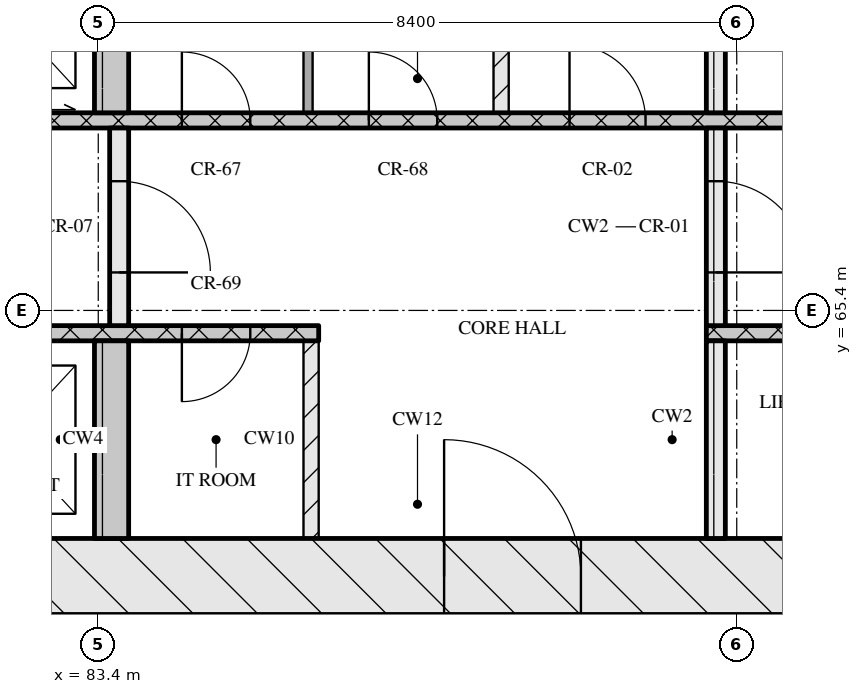
"""IFC4 building model, lengths in metres.
Left out: names, types, materials, properties, quantities, classifications, styles, units other than length and angle.
Written with IfcOpenShell. Run it as: python <this file> out.ifc"""

import sys

from ifc_helpers import new_model, si_unit, direction, frame, frame_2d, origin, place, context, subcontext, project, spatial, rectangle, extrude, element, fill, save


model = new_model("IFC4")
c1 = context("Model", 3, precision=1e-05, world=origin(), true_north=direction((0.0, 1.0)))
c2 = subcontext(c1, "Body", "Model", "MODEL_VIEW")
j1 = project(units=[si_unit("LENGTHUNIT", "METRE"), si_unit("PLANEANGLEUNIT", "RADIAN")], contexts=[c1])
p1 = place(None, origin())
s1 = spatial("IfcSite", under=j1, at=p1, CompositionType="ELEMENT")
p2 = place(p1, origin())
s2 = spatial("IfcBuilding", under=s1, at=p2, CompositionType="ELEMENT")
p3 = place(p2, frame((0.0, 0.0, 102.45)))
s3 = spatial("IfcBuildingStorey", under=s2, at=p3, CompositionType="ELEMENT", Elevation=102.45)
p4 = place(p3, frame((66.8, 61.9, 0.0), z_axis=(0.0, 0.0, 1.0), x_axis=(1.0, 0.0, 0.0)))
e1 = element("IfcWall", 1, at=p4, inside=s3, PredefinedType="SOLIDWALL", context=c2, shape_type="SweptSolid", body=[
    extrude(rectangle(XDim=41.6, YDim=1.0, at=frame_2d((20.8, 0.0))), origin(), (0.0, 0.0, 1.0), 3.32),
])
p5 = place(p4, frame((21.15, 0.0, 0.0)))
e2 = element("IfcOpeningElement", 2, at=p5, cuts=e1, PredefinedType="OPENING", context=c2, shape_type="SweptSolid", body=[
    extrude(rectangle(XDim=1.8, YDim=2.1, at=frame_2d((0.9, 1.05))), frame((0.0, 0.51, 0.0), z_axis=(0.0, -1.0, 0.0), x_axis=(1.0, 0.0, 0.0)), (0.0, 0.0, 1.0), 1.02),
])
p6 = place(p3, frame((83.575, 62.4, 0.0), z_axis=(0.0, 0.0, 1.0), x_axis=(0.0, 1.0, 0.0)))
e3 = element("IfcWall", 3, at=p6, inside=s3, PredefinedType="SOLIDWALL", context=c2, shape_type="SweptSolid", body=[
    extrude(rectangle(XDim=2.6, YDim=0.45, at=frame_2d((1.3, 0.0))), origin(), (0.0, 0.0, 1.0), 3.32),
])
p7 = place(p3, frame((86.2, 62.4, 0.0), z_axis=(0.0, 0.0, 1.0), x_axis=(0.0, 1.0, 0.0)))
e4 = element("IfcWall", 4, at=p7, inside=s3, PredefinedType="PARTITIONING", context=c2, shape_type="SweptSolid", body=[
    extrude(rectangle(XDim=2.6, YDim=0.2, at=frame_2d((1.3, 0.0))), origin(), (0.0, 0.0, 1.0), 3.32),
])
p8 = place(p3, frame((91.525, 62.4, 0.0), z_axis=(0.0, 0.0, 1.0), x_axis=(0.0, 1.0, 0.0)))
e5 = element("IfcWall", 5, at=p8, inside=s3, PredefinedType="SOLIDWALL", context=c2, shape_type="SweptSolid", body=[
    extrude(rectangle(XDim=2.6, YDim=0.25, at=frame_2d((1.3, 0.0))), origin(), (0.0, 0.0, 1.0), 3.32),
])
p9 = place(p3, frame((67.8, 65.1, 0.0), z_axis=(0.0, 0.0, 1.0), x_axis=(1.0, 0.0, 0.0)))
e6 = element("IfcWall", 6, at=p9, inside=s3, PredefinedType="SOLIDWALL", context=c2, shape_type="SweptSolid", body=[
    extrude(rectangle(XDim=18.5, YDim=0.2, at=frame_2d((9.25, 0.0))), origin(), (0.0, 0.0, 1.0), 3.32),
])
p10 = place(p9, frame((7.27, 0.0, 0.0)))
e7 = element("IfcOpeningElement", 7, at=p10, cuts=e6, PredefinedType="OPENING", context=c2, shape_type="SweptSolid", body=[
    extrude(rectangle(XDim=0.9, YDim=2.1, at=frame_2d((0.45, 1.05))), frame((0.0, 0.11, 0.0), z_axis=(0.0, -1.0, 0.0), x_axis=(1.0, 0.0, 0.0)), (0.0, 0.0, 1.0), 0.22),
])
p11 = place(p9, frame((8.85, 0.0, 0.0)))
e8 = element("IfcOpeningElement", 8, at=p11, cuts=e6, PredefinedType="OPENING", context=c2, shape_type="SweptSolid", body=[
    extrude(rectangle(XDim=1.1, YDim=2.1, at=frame_2d((0.55, 1.05))), frame((0.0, 0.11, 0.0), z_axis=(0.0, -1.0, 0.0), x_axis=(1.0, 0.0, 0.0)), (0.0, 0.0, 1.0), 0.22),
])
p12 = place(p9, frame((11.35, 0.0, 0.0)))
e9 = element("IfcOpeningElement", 9, at=p12, cuts=e6, PredefinedType="OPENING", context=c2, shape_type="SweptSolid", body=[
    extrude(rectangle(XDim=1.1, YDim=2.1, at=frame_2d((0.55, 1.05))), frame((0.0, 0.11, 0.0), z_axis=(0.0, -1.0, 0.0), x_axis=(1.0, 0.0, 0.0)), (0.0, 0.0, 1.0), 0.22),
])
p13 = place(p9, frame((13.85, 0.0, 0.0)))
e10 = element("IfcOpeningElement", 10, at=p13, cuts=e6, PredefinedType="OPENING", context=c2, shape_type="SweptSolid", body=[
    extrude(rectangle(XDim=1.1, YDim=2.1, at=frame_2d((0.55, 1.05))), frame((0.0, 0.11, 0.0), z_axis=(0.0, -1.0, 0.0), x_axis=(1.0, 0.0, 0.0)), (0.0, 0.0, 1.0), 0.22),
])
p14 = place(p9, frame((16.7, 0.0, 0.0)))
e11 = element("IfcOpeningElement", 11, at=p14, cuts=e6, PredefinedType="OPENING", context=c2, shape_type="SweptSolid", body=[
    extrude(rectangle(XDim=0.9, YDim=2.1, at=frame_2d((0.45, 1.05))), frame((0.0, 0.11, 0.0), z_axis=(0.0, -1.0, 0.0), x_axis=(1.0, 0.0, 0.0)), (0.0, 0.0, 1.0), 0.22),
])
p15 = place(p3, frame((91.4, 65.1, 0.0), z_axis=(0.0, 0.0, 1.0), x_axis=(1.0, 0.0, 0.0)))
e12 = element("IfcWall", 12, at=p15, inside=s3, PredefinedType="SOLIDWALL", context=c2, shape_type="SweptSolid", body=[
    extrude(rectangle(XDim=16.0, YDim=0.2, at=frame_2d((8.0, 0.0))), origin(), (0.0, 0.0, 1.0), 3.32),
])
p16 = place(p15, frame((7.83, 0.0, 0.0)))
e13 = element("IfcOpeningElement", 13, at=p16, cuts=e12, PredefinedType="OPENING", context=c2, shape_type="SweptSolid", body=[
    extrude(rectangle(XDim=0.9, YDim=2.1, at=frame_2d((0.45, 1.05))), frame((0.0, 0.11, 0.0), z_axis=(0.0, -1.0, 0.0), x_axis=(1.0, 0.0, 0.0)), (0.0, 0.0, 1.0), 0.22),
])
p17 = place(p3, frame((83.675, 65.2, 0.0), z_axis=(0.0, 0.0, 1.0), x_axis=(0.0, 1.0, 0.0)))
e14 = element("IfcWall", 14, at=p17, inside=s3, PredefinedType="SOLIDWALL", context=c2, shape_type="SweptSolid", body=[
    extrude(rectangle(XDim=2.6, YDim=0.25, at=frame_2d((1.3, 0.0))), origin(), (0.0, 0.0, 1.0), 3.32),
])
p18 = place(p17, frame((0.7, 0.0, 0.0)))
e15 = element("IfcOpeningElement", 15, at=p18, cuts=e14, PredefinedType="OPENING", context=c2, shape_type="SweptSolid", body=[
    extrude(rectangle(XDim=1.2, YDim=2.1, at=frame_2d((0.6, 1.05))), frame((0.0, 0.135, 0.0), z_axis=(0.0, -1.0, 0.0), x_axis=(1.0, 0.0, 0.0)), (0.0, 0.0, 1.0), 0.27),
])
p19 = place(p3, frame((91.525, 65.2, 0.0), z_axis=(0.0, 0.0, 1.0), x_axis=(0.0, 1.0, 0.0)))
e16 = element("IfcWall", 16, at=p19, inside=s3, PredefinedType="SOLIDWALL", context=c2, shape_type="SweptSolid", body=[
    extrude(rectangle(XDim=2.6, YDim=0.25, at=frame_2d((1.3, 0.0))), origin(), (0.0, 0.0, 1.0), 3.32),
])
p20 = place(p19, frame((0.7, 0.0, 0.0)))
e17 = element("IfcOpeningElement", 17, at=p20, cuts=e16, PredefinedType="OPENING", context=c2, shape_type="SweptSolid", body=[
    extrude(rectangle(XDim=1.2, YDim=2.1, at=frame_2d((0.6, 1.05))), frame((0.0, 0.135, 0.0), z_axis=(0.0, -1.0, 0.0), x_axis=(1.0, 0.0, 0.0)), (0.0, 0.0, 1.0), 0.27),
])
p21 = place(p3, frame((76.05, 67.9, 0.0), z_axis=(0.0, 0.0, 1.0), x_axis=(1.0, 0.0, 0.0)))
e18 = element("IfcWall", 18, at=p21, inside=s3, PredefinedType="SOLIDWALL", context=c2, shape_type="SweptSolid", body=[
    extrude(rectangle(XDim=23.1, YDim=0.2, at=frame_2d((11.55, 0.0))), origin(), (0.0, 0.0, 1.0), 3.32),
])
p22 = place(p21, frame((0.6, 0.0, 0.0)))
e19 = element("IfcOpeningElement", 19, at=p22, cuts=e18, PredefinedType="OPENING", context=c2, shape_type="SweptSolid", body=[
    extrude(rectangle(XDim=1.1, YDim=2.1, at=frame_2d((0.55, 1.05))), frame((0.0, 0.11, 0.0), z_axis=(0.0, -1.0, 0.0), x_axis=(1.0, 0.0, 0.0)), (0.0, 0.0, 1.0), 0.22),
])
p23 = place(p21, frame((3.1, 0.0, 0.0)))
e20 = element("IfcOpeningElement", 20, at=p23, cuts=e18, PredefinedType="OPENING", context=c2, shape_type="SweptSolid", body=[
    extrude(rectangle(XDim=1.1, YDim=2.1, at=frame_2d((0.55, 1.05))), frame((0.0, 0.11, 0.0), z_axis=(0.0, -1.0, 0.0), x_axis=(1.0, 0.0, 0.0)), (0.0, 0.0, 1.0), 0.22),
])
p24 = place(p21, frame((5.6, 0.0, 0.0)))
e21 = element("IfcOpeningElement", 21, at=p24, cuts=e18, PredefinedType="OPENING", context=c2, shape_type="SweptSolid", body=[
    extrude(rectangle(XDim=1.1, YDim=2.1, at=frame_2d((0.55, 1.05))), frame((0.0, 0.11, 0.0), z_axis=(0.0, -1.0, 0.0), x_axis=(1.0, 0.0, 0.0)), (0.0, 0.0, 1.0), 0.22),
])
p25 = place(p21, frame((8.45, 0.0, 0.0)))
e22 = element("IfcOpeningElement", 22, at=p25, cuts=e18, PredefinedType="OPENING", context=c2, shape_type="SweptSolid", body=[
    extrude(rectangle(XDim=0.9, YDim=2.1, at=frame_2d((0.45, 1.05))), frame((0.0, 0.11, 0.0), z_axis=(0.0, -1.0, 0.0), x_axis=(1.0, 0.0, 0.0)), (0.0, 0.0, 1.0), 0.22),
])
p26 = place(p21, frame((10.91, 0.0, 0.0)))
e23 = element("IfcOpeningElement", 23, at=p26, cuts=e18, PredefinedType="OPENING", context=c2, shape_type="SweptSolid", body=[
    extrude(rectangle(XDim=0.9, YDim=2.1, at=frame_2d((0.45, 1.05))), frame((0.0, 0.11, 0.0), z_axis=(0.0, -1.0, 0.0), x_axis=(1.0, 0.0, 0.0)), (0.0, 0.0, 1.0), 0.22),
])
p27 = place(p21, frame((13.55, 0.0, 0.0)))
e24 = element("IfcOpeningElement", 24, at=p27, cuts=e18, PredefinedType="OPENING", context=c2, shape_type="SweptSolid", body=[
    extrude(rectangle(XDim=1.0, YDim=2.1, at=frame_2d((0.5, 1.05))), frame((0.0, 0.11, 0.0), z_axis=(0.0, -1.0, 0.0), x_axis=(1.0, 0.0, 0.0)), (0.0, 0.0, 1.0), 0.22),
])
p28 = place(p3, frame((83.575, 68.0, 0.0), z_axis=(0.0, 0.0, 1.0), x_axis=(0.0, 1.0, 0.0)))
e25 = element("IfcWall", 25, at=p28, inside=s3, PredefinedType="SOLIDWALL", context=c2, shape_type="SweptSolid", body=[
    extrude(rectangle(XDim=2.6, YDim=0.45, at=frame_2d((1.3, 0.0))), origin(), (0.0, 0.0, 1.0), 3.32),
])
p29 = place(p3, frame((86.16, 68.0, 0.0), z_axis=(0.0, 0.0, 1.0), x_axis=(0.0, 1.0, 0.0)))
e26 = element("IfcWall", 26, at=p29, inside=s3, PredefinedType="PARTITIONING", context=c2, shape_type="SweptSolid", body=[
    extrude(rectangle(XDim=2.6, YDim=0.12, at=frame_2d((1.3, 0.0))), origin(), (0.0, 0.0, 1.0), 3.32),
])
p30 = place(p3, frame((88.7, 68.0, 0.0), z_axis=(0.0, 0.0, 1.0), x_axis=(0.0, 1.0, 0.0)))
e27 = element("IfcWall", 27, at=p30, inside=s3, PredefinedType="PARTITIONING", context=c2, shape_type="SweptSolid", body=[
    extrude(rectangle(XDim=2.6, YDim=0.2, at=frame_2d((1.3, 0.0))), origin(), (0.0, 0.0, 1.0), 3.32),
])
p31 = place(p3, frame((91.525, 68.0, 0.0), z_axis=(0.0, 0.0, 1.0), x_axis=(0.0, 1.0, 0.0)))
e28 = element("IfcWall", 28, at=p31, inside=s3, PredefinedType="SOLIDWALL", context=c2, shape_type="SweptSolid", body=[
    extrude(rectangle(XDim=2.6, YDim=0.25, at=frame_2d((1.3, 0.0))), origin(), (0.0, 0.0, 1.0), 3.32),
])
p32 = place(p5, origin())
e29 = element("IfcDoor", 29, at=p32, inside=s3, OperationType="DOUBLE_DOOR_SINGLE_SWING", PredefinedType="DOOR", context=c2, shape_type="SweptSolid", body=[
    extrude(rectangle(XDim=1.8, YDim=2.1, at=frame_2d((0.9, 1.05))), frame((0.0, 0.025, 0.0), z_axis=(0.0, -1.0, 0.0), x_axis=(1.0, 0.0, 0.0)), (0.0, 0.0, 1.0), 0.05),
])
fill(e2, e29)
p33 = place(p14, origin())
e30 = element("IfcDoor", 30, at=p33, inside=s3, OperationType="SINGLE_SWING_RIGHT", PredefinedType="DOOR", context=c2, shape_type="SweptSolid", body=[
    extrude(rectangle(XDim=0.9, YDim=2.1, at=frame_2d((0.45, 1.05))), frame((0.0, 0.025, 0.0), z_axis=(0.0, -1.0, 0.0), x_axis=(1.0, 0.0, 0.0)), (0.0, 0.0, 1.0), 0.05),
])
fill(e11, e30)
p34 = place(p18, origin())
e31 = element("IfcDoor", 31, at=p34, inside=s3, OperationType="SINGLE_SWING_RIGHT", PredefinedType="DOOR", context=c2, shape_type="SweptSolid", body=[
    extrude(rectangle(XDim=1.2, YDim=2.1, at=frame_2d((0.6, 1.05))), frame((0.0, 0.025, 0.0), z_axis=(0.0, -1.0, 0.0), x_axis=(1.0, 0.0, 0.0)), (0.0, 0.0, 1.0), 0.05),
])
fill(e15, e31)
p35 = place(p20, origin())
e32 = element("IfcDoor", 32, at=p35, inside=s3, OperationType="SINGLE_SWING_RIGHT", PredefinedType="DOOR", context=c2, shape_type="SweptSolid", body=[
    extrude(rectangle(XDim=1.2, YDim=2.1, at=frame_2d((0.6, 1.05))), frame((0.0, 0.025, 0.0), z_axis=(0.0, -1.0, 0.0), x_axis=(1.0, 0.0, 0.0)), (0.0, 0.0, 1.0), 0.05),
])
fill(e17, e32)
p36 = place(p25, origin())
e33 = element("IfcDoor", 33, at=p36, inside=s3, OperationType="SINGLE_SWING_LEFT", PredefinedType="DOOR", context=c2, shape_type="SweptSolid", body=[
    extrude(rectangle(XDim=0.9, YDim=2.1, at=frame_2d((0.45, 1.05))), frame((0.0, 0.025, 0.0), z_axis=(0.0, -1.0, 0.0), x_axis=(1.0, 0.0, 0.0)), (0.0, 0.0, 1.0), 0.05),
])
fill(e22, e33)
p37 = place(p26, origin())
e34 = element("IfcDoor", 34, at=p37, inside=s3, OperationType="SINGLE_SWING_LEFT", PredefinedType="DOOR", context=c2, shape_type="SweptSolid", body=[
    extrude(rectangle(XDim=0.9, YDim=2.1, at=frame_2d((0.45, 1.05))), frame((0.0, 0.025, 0.0), z_axis=(0.0, -1.0, 0.0), x_axis=(1.0, 0.0, 0.0)), (0.0, 0.0, 1.0), 0.05),
])
fill(e23, e34)
p38 = place(p27, origin())
e35 = element("IfcDoor", 35, at=p38, inside=s3, OperationType="SINGLE_SWING_LEFT", PredefinedType="DOOR", context=c2, shape_type="SweptSolid", body=[
    extrude(rectangle(XDim=1.0, YDim=2.1, at=frame_2d((0.5, 1.05))), frame((0.0, 0.025, 0.0), z_axis=(0.0, -1.0, 0.0), x_axis=(1.0, 0.0, 0.0)), (0.0, 0.0, 1.0), 0.05),
])
fill(e24, e35)
save(model, sys.argv[1])
